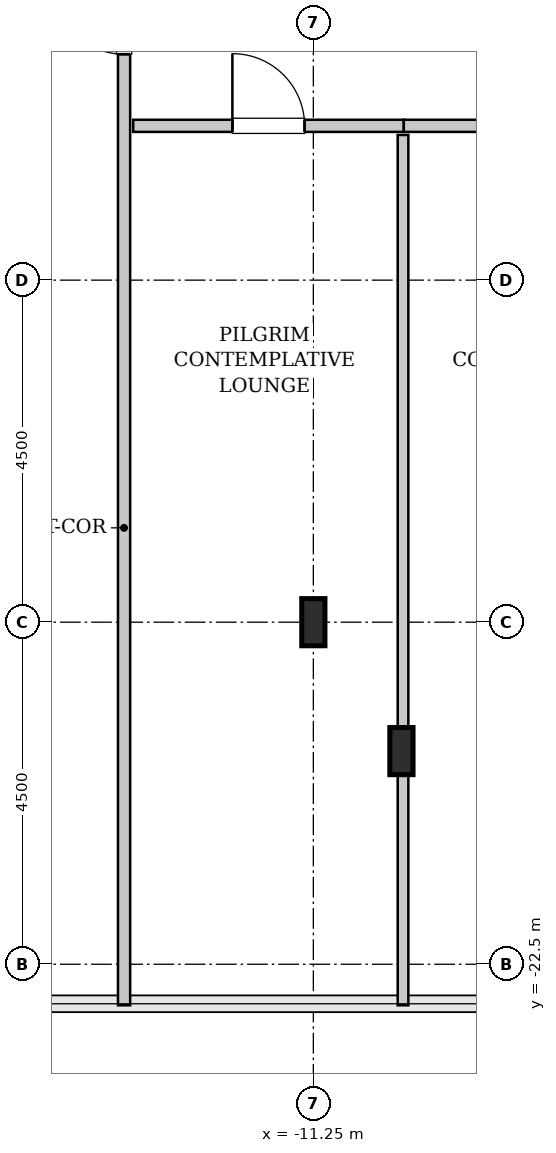
"""IFC4 building model, lengths in metres.
Left out: names, types, materials, properties, quantities, classifications, styles, units other than length and angle.
Written with IfcOpenShell. Run it as: python <this file> out.ifc"""

import sys

from ifc_helpers import new_model, si_unit, direction, frame, frame_2d, origin, origin_2d, place, context, subcontext, project, spatial, rectangle, i_section, extrude, source, transform, mapped, element, fill, save


model = new_model("IFC4")
c1 = context("Model", 3, precision=1e-05, world=origin(), true_north=direction((0.0, 1.0)))
c2 = subcontext(c1, "Body", "Model", "MODEL_VIEW")
j1 = project(units=[si_unit("LENGTHUNIT", "METRE"), si_unit("PLANEANGLEUNIT", "RADIAN")], contexts=[c1])
p1 = place(None, origin())
s1 = spatial("IfcSite", under=j1, at=p1, CompositionType="ELEMENT")
p2 = place(p1, origin())
s2 = spatial("IfcBuilding", under=s1, at=p2, CompositionType="ELEMENT")
p3 = place(p2, frame((0.0, 0.0, 302.6)))
s3 = spatial("IfcBuildingStorey", under=s2, at=p3, CompositionType="ELEMENT", Elevation=302.6)
m1 = source(origin(), c2, "Body", "SweptSolid", [
    extrude(i_section(OverallWidth=0.305, OverallDepth=0.62, WebThickness=0.021, FlangeThickness=0.04, FilletRadius=0.027, at=origin_2d()), origin(), (0.0, 0.0, 1.0), 3.8),
])
for number, where, z_axis, x_axis in (
    (1, (-11.25, -18.0, 0.0), (0.0, 0.0, 1.0), (1.0, 0.0, 0.0)),
    (2, (-10.091, -19.696, 0.0), (0.0, 0.0, 1.0), (1.0, 0.0, 0.0)),
):
    element("IfcColumn", number, at=place(p3, frame(where, z_axis=z_axis, x_axis=x_axis)), inside=s3, PredefinedType="COLUMN", context=c2, shape_type="MappedRepresentation", body=[
        mapped(m1, transform((0.0, 0.0, 0.0), x_axis=(1.0, 0.0, 0.0), y_axis=(0.0, 1.0, 0.0), z_axis=(0.0, 0.0, 1.0), scale=1.0)),
    ])
m2 = source(origin(), c2, "Body", "SweptSolid", [
    extrude(rectangle(XDim=14.445, YDim=0.16, at=frame_2d((7.223, 0.0))), origin(), (0.0, 0.0, 1.0), 3.535),
])
p4 = place(p3, frame((-13.74, -23.04, 0.0), z_axis=(0.0, 0.0, 1.0), x_axis=(0.0, 1.0, 0.0)))
e3 = element("IfcWall", 3, at=p4, inside=s3, PredefinedType="PARTITIONING", context=c2, shape_type="MappedRepresentation", body=[
    mapped(m2, transform((0.0, 0.0, 0.0), x_axis=(1.0, 0.0, 0.0), y_axis=(0.0, 1.0, 0.0), z_axis=(0.0, 0.0, 1.0), scale=1.0)),
])
p5 = place(p4, frame((12.512, 0.0, 0.0)))
e4 = element("IfcOpeningElement", 4, at=p5, cuts=e3, PredefinedType="OPENING", context=c2, shape_type="SweptSolid", body=[
    extrude(rectangle(XDim=0.95, YDim=2.1, at=frame_2d((0.475, 1.05))), frame((0.0, 0.09, 0.0), z_axis=(0.0, -1.0, 0.0), x_axis=(1.0, 0.0, 0.0)), (0.0, 0.0, 1.0), 0.18),
])
m3 = source(origin(), c2, "Body", "SweptSolid", [
    extrude(rectangle(XDim=3.56, YDim=0.16, at=frame_2d((1.78, 0.0))), origin(), (0.0, 0.0, 1.0), 3.535),
])
p6 = place(p3, frame((-13.62, -11.47, 0.0), z_axis=(0.0, 0.0, 1.0), x_axis=(1.0, 0.0, 0.0)))
e5 = element("IfcWall", 5, at=p6, inside=s3, PredefinedType="PARTITIONING", context=c2, shape_type="MappedRepresentation", body=[
    mapped(m3, transform((0.0, 0.0, 0.0), x_axis=(1.0, 0.0, 0.0), y_axis=(0.0, 1.0, 0.0), z_axis=(0.0, 0.0, 1.0), scale=1.0)),
])
p7 = place(p6, frame((1.305, 0.0, 0.0)))
e6 = element("IfcOpeningElement", 6, at=p7, cuts=e5, PredefinedType="OPENING", context=c2, shape_type="SweptSolid", body=[
    extrude(rectangle(XDim=0.95, YDim=2.1, at=frame_2d((0.475, 1.05))), frame((0.0, 0.09, 0.0), z_axis=(0.0, -1.0, 0.0), x_axis=(1.0, 0.0, 0.0)), (0.0, 0.0, 1.0), 0.18),
])
m4 = source(origin(), c2, "Body", "SweptSolid", [
    extrude(rectangle(XDim=11.45, YDim=0.14, at=frame_2d((5.725, 0.0))), origin(), (0.0, 0.0, 1.0), 3.535),
])
p8 = place(p3, frame((-10.07, -23.04, 0.0), z_axis=(0.0, 0.0, 1.0), x_axis=(0.0, 1.0, 0.0)))
e7 = element("IfcWall", 7, at=p8, inside=s3, PredefinedType="PARTITIONING", context=c2, shape_type="MappedRepresentation", body=[
    mapped(m4, transform((0.0, 0.0, 0.0), x_axis=(1.0, 0.0, 0.0), y_axis=(0.0, 1.0, 0.0), z_axis=(0.0, 0.0, 1.0), scale=1.0)),
])
m5 = source(origin(), c2, "Body", "SweptSolid", [
    extrude(rectangle(XDim=3.665, YDim=0.16, at=frame_2d((1.833, 0.0))), origin(), (0.0, 0.0, 1.0), 3.535),
])
p9 = place(p3, frame((-10.06, -11.47, 0.0), z_axis=(0.0, 0.0, 1.0), x_axis=(1.0, 0.0, 0.0)))
e8 = element("IfcWall", 8, at=p9, inside=s3, PredefinedType="PARTITIONING", context=c2, shape_type="MappedRepresentation", body=[
    mapped(m5, transform((0.0, 0.0, 0.0), x_axis=(1.0, 0.0, 0.0), y_axis=(0.0, 1.0, 0.0), z_axis=(0.0, 0.0, 1.0), scale=1.0)),
])
p10 = place(p9, frame((1.357, 0.0, 0.0)))
e9 = element("IfcOpeningElement", 9, at=p10, cuts=e8, PredefinedType="OPENING", context=c2, shape_type="SweptSolid", body=[
    extrude(rectangle(XDim=0.95, YDim=2.1, at=frame_2d((0.475, 1.05))), frame((0.0, 0.09, 0.0), z_axis=(0.0, -1.0, 0.0), x_axis=(1.0, 0.0, 0.0)), (0.0, 0.0, 1.0), 0.18),
])
m6 = source(origin(), c2, "Body", "SweptSolid", [
    extrude(rectangle(XDim=0.95, YDim=2.1, at=frame_2d((0.475, 1.05))), frame((0.0, 0.025, 0.0), z_axis=(0.0, -1.0, 0.0), x_axis=(1.0, 0.0, 0.0)), (0.0, 0.0, 1.0), 0.05),
])
p11 = place(p5, origin())
e10 = element("IfcDoor", 10, at=p11, inside=s3, OperationType="SINGLE_SWING_RIGHT", PredefinedType="DOOR", context=c2, shape_type="MappedRepresentation", body=[
    mapped(m6, transform((0.0, 0.0, 0.0), x_axis=(1.0, 0.0, 0.0), y_axis=(0.0, 1.0, 0.0), z_axis=(0.0, 0.0, 1.0), scale=1.0)),
])
fill(e4, e10)
p12 = place(p7, origin())
e11 = element("IfcDoor", 11, at=p12, inside=s3, OperationType="SINGLE_SWING_LEFT", PredefinedType="DOOR", context=c2, shape_type="MappedRepresentation", body=[
    mapped(m6, transform((0.0, 0.0, 0.0), x_axis=(1.0, 0.0, 0.0), y_axis=(0.0, 1.0, 0.0), z_axis=(0.0, 0.0, 1.0), scale=1.0)),
])
fill(e6, e11)
save(model, sys.argv[1])
